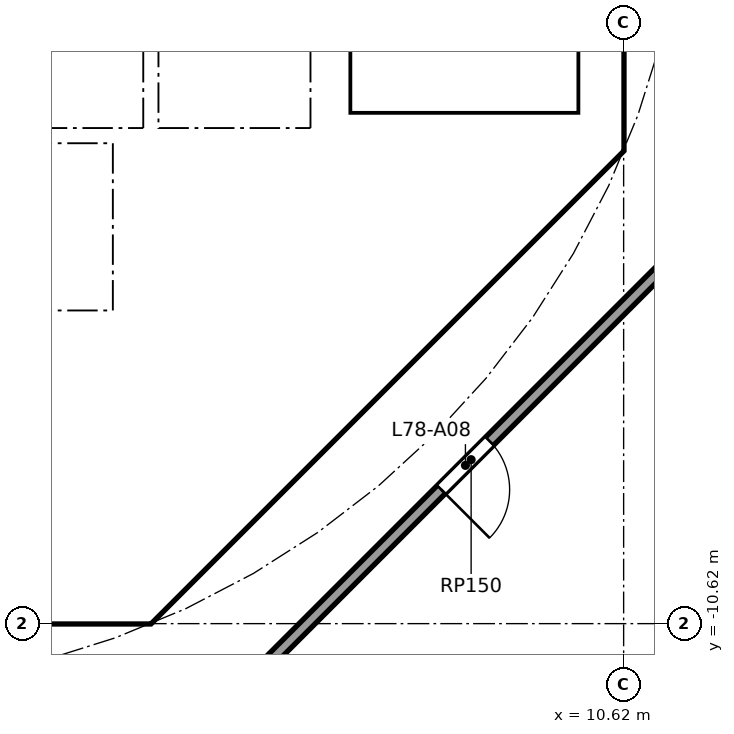
"""IFC4 building model, lengths in metres.
Left out: names, types, materials, properties, quantities, classifications, styles, units other than length and angle.
Written with IfcOpenShell. Run it as: python <this file> out.ifc"""

import sys

from ifc_helpers import new_model, si_unit, direction, frame, frame_2d, origin, place, context, subcontext, project, spatial, polyline, rectangle, outline, extrude, element, fill, save


model = new_model("IFC4")
c1 = context("Model", 3, precision=1e-05, world=origin(), true_north=direction((0.0, 1.0)))
c2 = subcontext(c1, "Body", "Model", "MODEL_VIEW")
j1 = project(units=[si_unit("LENGTHUNIT", "METRE"), si_unit("PLANEANGLEUNIT", "RADIAN")], contexts=[c1])
p1 = place(None, origin())
s1 = spatial("IfcSite", under=j1, at=p1, CompositionType="ELEMENT")
p2 = place(p1, origin())
s2 = spatial("IfcBuilding", under=s1, at=p2, CompositionType="ELEMENT")
p3 = place(p2, frame((0.0, 0.0, 315.9)))
s3 = spatial("IfcBuildingStorey", under=s2, at=p3, CompositionType="ELEMENT", Elevation=315.9)
p4 = place(p3, frame((4.613, -9.988, 0.0), z_axis=(0.0, 0.0, 1.0), x_axis=(0.707106781187, 0.707106781187, 0.0)))
e1 = element("IfcWall", 1, at=p4, inside=s3, PredefinedType="SHEAR", context=c2, shape_type="SweptSolid", body=[
    extrude(rectangle(XDim=7.602, YDim=0.6, at=frame_2d((3.801, 0.0))), origin(), (0.0, 0.0, 1.0), 4.2),
])
p5 = place(p4, frame((3.201, 0.0, 0.0)))
e2 = element("IfcOpeningElement", 2, at=p5, cuts=e1, PredefinedType="OPENING", context=c2, shape_type="SweptSolid", body=[
    extrude(rectangle(XDim=1.2, YDim=2.1, at=frame_2d((0.6, 1.05))), frame((0.0, 0.31, 0.0), z_axis=(0.0, -1.0, 0.0), x_axis=(1.0, 0.0, 0.0)), (0.0, 0.0, 1.0), 0.62),
])
p6 = place(p3, frame((4.0, -10.025, 0.0), z_axis=(0.0, 0.0, 1.0), x_axis=(0.0, 1.0, 0.0)))
e3 = element("IfcWall", 3, at=p6, inside=s3, PredefinedType="SOLIDWALL", context=c2, shape_type="SweptSolid", body=[
    extrude(rectangle(XDim=3.0, YDim=0.2, at=frame_2d((1.5, 0.0))), origin(), (0.0, 0.0, 1.0), 4.2),
])
p7 = place(p6, frame((0.975, 0.0, 0.0)))
e4 = element("IfcOpeningElement", 4, at=p7, cuts=e3, PredefinedType="OPENING", context=c2, shape_type="SweptSolid", body=[
    extrude(rectangle(XDim=1.1, YDim=2.1, at=frame_2d((0.55, 1.05))), frame((0.0, 0.11, 0.0), z_axis=(0.0, -1.0, 0.0), x_axis=(1.0, 0.0, 0.0)), (0.0, 0.0, 1.0), 0.22),
])
p8 = place(p3, frame((4.0, -6.5, 0.0), z_axis=(0.0, 0.0, 1.0), x_axis=(0.0, 1.0, 0.0)))
e5 = element("IfcWall", 5, at=p8, inside=s3, PredefinedType="SOLIDWALL", context=c2, shape_type="SweptSolid", body=[
    extrude(rectangle(XDim=2.2, YDim=0.2, at=frame_2d((1.1, 0.0))), origin(), (0.0, 0.0, 1.0), 4.2),
])
p9 = place(p8, frame((0.55, 0.0, 0.0)))
e6 = element("IfcOpeningElement", 6, at=p9, cuts=e5, PredefinedType="OPENING", context=c2, shape_type="SweptSolid", body=[
    extrude(rectangle(XDim=1.1, YDim=2.1, at=frame_2d((0.55, 1.05))), frame((0.0, 0.11, 0.0), z_axis=(0.0, -1.0, 0.0), x_axis=(1.0, 0.0, 0.0)), (0.0, 0.0, 1.0), 0.22),
])
p10 = place(p3, origin())
e7 = element("IfcWall", 7, at=p10, inside=s3, PredefinedType="SHEAR", context=c2, shape_type="SweptSolid", body=[
    extrude(outline(polyline([(-4.152, -10.025), (4.152, -10.025), (4.401, -9.776), (4.825, -10.2), (4.401, -10.625), (-4.401, -10.625), (-4.825, -10.2), (-4.401, -9.776), (-4.152, -10.025)])), origin(), (0.0, 0.0, 1.0), 4.2),
])
p11 = place(p3, origin())
e8 = element("IfcWall", 8, at=p11, inside=s3, PredefinedType="SHEAR", context=c2, shape_type="SweptSolid", body=[
    extrude(outline(polyline([(9.776, -4.401), (10.025, -4.152), (10.025, -3.801), (10.025, 4.152), (9.776, 4.401), (10.2, 4.825), (10.625, 4.401), (10.625, -4.401), (10.2, -4.825), (9.776, -4.401)])), origin(), (0.0, 0.0, 1.0), 4.2),
])
p12 = place(p3, origin())
e9 = element("IfcWall", 9, at=p12, inside=s3, PredefinedType="SOLIDWALL", context=c2, shape_type="SweptSolid", body=[
    extrude(outline(polyline([(-6.7, -2.1), (-6.5, -2.1), (-6.5, -4.1), (-2.3, -4.1), (-2.3, -2.1), (-2.1, -2.1), (-2.1, -4.1), (2.1, -4.1), (2.1, -2.1), (2.3, -2.1), (2.3, -4.1), (4.3, -4.1), (4.3, -2.1), (4.5, -2.1), (4.5, -4.1), (6.5, -4.1), (6.5, -2.1), (6.7, -2.1), (6.7, -4.3), (-6.7, -4.3), (-6.7, -2.1)])), origin(), (0.0, 0.0, 1.0), 4.2),
])
p13 = place(p3, origin())
e10 = element("IfcWall", 10, at=p13, inside=s3, PredefinedType="SOLIDWALL", context=c2, shape_type="SweptSolid", body=[
    extrude(outline(polyline([(4.1, -7.025), (-4.1, -7.025), (-4.1, -6.5), (4.1, -6.5), (4.1, -7.025)])), origin(), (0.0, 0.0, 1.0), 4.2),
])
p14 = place(p3, origin())
e11 = element("IfcWall", 11, at=p14, inside=s3, PredefinedType="SOLIDWALL", context=c2, shape_type="SweptSolid", body=[
    extrude(outline(polyline([(7.025, -3.9), (6.7, -3.9), (6.7, 3.9), (7.025, 3.9), (7.025, -3.9)])), origin(), (0.0, 0.0, 1.0), 4.2),
])
p15 = place(p3, origin())
e12 = element("IfcWall", 12, at=p15, inside=s3, PredefinedType="SOLIDWALL", context=c2, shape_type="SweptSolid", body=[
    extrude(outline(polyline([(10.025, -4.1), (6.7, -4.1), (6.7, -3.9), (10.025, -3.9), (10.025, -4.1)])), origin(), (0.0, 0.0, 1.0), 4.2),
])
p16 = place(p3, frame((12.15, -4.926, 0.0), z_axis=(0.0, 0.0, 1.0), x_axis=(-0.707057968072, -0.707155590932, 0.0)))
e13 = element("IfcWall", 13, at=p16, inside=s3, PredefinedType="PARTITIONING", context=c2, shape_type="SweptSolid", body=[
    extrude(rectangle(XDim=10.003, YDim=0.15, at=frame_2d((5.002, 0.0))), origin(), (0.0, 0.0, 1.0), 4.2),
])
p17 = place(p16, frame((4.658, 0.0, 0.0)))
e14 = element("IfcOpeningElement", 14, at=p17, cuts=e13, PredefinedType="OPENING", context=c2, shape_type="SweptSolid", body=[
    extrude(rectangle(XDim=0.9, YDim=2.1, at=frame_2d((0.45, 1.05))), frame((0.0, 0.085, 0.0), z_axis=(0.0, -1.0, 0.0), x_axis=(1.0, 0.0, 0.0)), (0.0, 0.0, 1.0), 0.17),
])
p18 = place(p9, origin())
e15 = element("IfcDoor", 15, at=p18, inside=s3, OperationType="DOUBLE_DOOR_SLIDING", PredefinedType="DOOR", context=c2, shape_type="SweptSolid", body=[
    extrude(rectangle(XDim=1.1, YDim=2.1, at=frame_2d((0.55, 1.05))), frame((0.0, 0.025, 0.0), z_axis=(0.0, -1.0, 0.0), x_axis=(1.0, 0.0, 0.0)), (0.0, 0.0, 1.0), 0.05),
])
fill(e6, e15)
p19 = place(p7, origin())
e16 = element("IfcDoor", 16, at=p19, inside=s3, OperationType="SINGLE_SWING_LEFT", PredefinedType="DOOR", context=c2, shape_type="SweptSolid", body=[
    extrude(rectangle(XDim=1.1, YDim=2.1, at=frame_2d((0.55, 1.05))), frame((0.0, 0.025, 0.0), z_axis=(0.0, -1.0, 0.0), x_axis=(1.0, 0.0, 0.0)), (0.0, 0.0, 1.0), 0.05),
])
fill(e4, e16)
p20 = place(p5, origin())
e17 = element("IfcDoor", 17, at=p20, inside=s3, OperationType="SINGLE_SWING_LEFT", PredefinedType="DOOR", context=c2, shape_type="SweptSolid", body=[
    extrude(rectangle(XDim=1.2, YDim=2.1, at=frame_2d((0.6, 1.05))), frame((0.0, 0.025, 0.0), z_axis=(0.0, -1.0, 0.0), x_axis=(1.0, 0.0, 0.0)), (0.0, 0.0, 1.0), 0.05),
])
fill(e2, e17)
p21 = place(p17, origin())
e18 = element("IfcDoor", 18, at=p21, inside=s3, OperationType="SINGLE_SWING_RIGHT", PredefinedType="DOOR", context=c2, shape_type="SweptSolid", body=[
    extrude(rectangle(XDim=0.9, YDim=2.1, at=frame_2d((0.45, 1.05))), frame((0.0, 0.025, 0.0), z_axis=(0.0, -1.0, 0.0), x_axis=(1.0, 0.0, 0.0)), (0.0, 0.0, 1.0), 0.05),
])
fill(e14, e18)
save(model, sys.argv[1])
